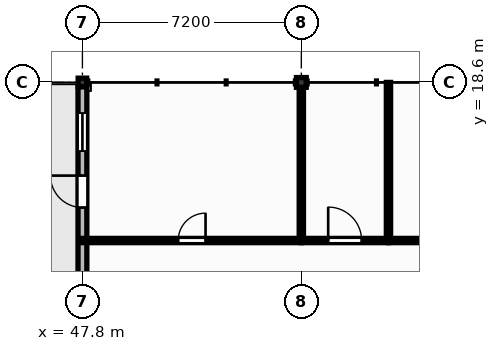
"""IFC4 building model, lengths in metres.
Left out: names, types, materials, properties, quantities, classifications, styles, units other than length and angle.
Written with IfcOpenShell. Run it as: python <this file> out.ifc"""

import sys

from ifc_helpers import new_model, si_unit, direction, frame, frame_2d, origin, origin_2d, place, context, subcontext, project, spatial, rectangle, extrude, element, fill, save


model = new_model("IFC4")
c1 = context("Model", 3, precision=1e-05, world=origin(), true_north=direction((0.0, 1.0)))
c2 = subcontext(c1, "Body", "Model", "MODEL_VIEW")
j1 = project(units=[si_unit("LENGTHUNIT", "METRE"), si_unit("PLANEANGLEUNIT", "RADIAN")], contexts=[c1])
p1 = place(None, origin())
s1 = spatial("IfcSite", under=j1, at=p1, CompositionType="ELEMENT")
p2 = place(p1, origin())
s2 = spatial("IfcBuilding", under=s1, at=p2, CompositionType="ELEMENT")
p3 = place(p2, frame((0.0, 0.0, 13.2)))
s3 = spatial("IfcBuildingStorey", under=s2, at=p3, CompositionType="ELEMENT", Elevation=13.2)
p4 = place(p3, frame((47.8, 18.6, 0.0), z_axis=(0.0, 0.0, 1.0), x_axis=(1.0, 0.0, 0.0)))
e1 = element("IfcColumn", 1, at=p4, inside=s3, PredefinedType="COLUMN", context=c2, shape_type="SweptSolid", body=[
    extrude(rectangle(XDim=0.28, YDim=0.28, at=origin_2d()), origin(), (0.0, 0.0, 1.0), 8.109),
])
p5 = place(p3, frame((55.0, 18.6, 0.0), z_axis=(0.0, 0.0, 1.0), x_axis=(1.0, 0.0, 0.0)))
e2 = element("IfcColumn", 2, at=p5, inside=s3, PredefinedType="COLUMN", context=c2, shape_type="SweptSolid", body=[
    extrude(rectangle(XDim=0.32, YDim=0.32, at=origin_2d()), origin(), (0.0, 0.0, 1.0), 8.109),
])
p6 = place(p3, frame((47.8, 11.56, 0.0), z_axis=(0.0, 0.0, 1.0), x_axis=(0.0, 1.0, 0.0)))
e3 = element("IfcWall", 3, at=p6, inside=s3, PredefinedType="SOLIDWALL", context=c2, shape_type="SweptSolid", body=[
    extrude(rectangle(XDim=6.9, YDim=0.29, at=frame_2d((3.45, 0.0))), origin(), (0.0, 0.0, 1.0), 4.0),
])
p7 = place(p6, frame((2.925, 0.0, 0.0)))
e4 = element("IfcOpeningElement", 4, at=p7, cuts=e3, PredefinedType="OPENING", context=c2, shape_type="SweptSolid", body=[
    extrude(rectangle(XDim=1.05, YDim=2.2, at=frame_2d((0.525, 1.1))), frame((0.0, 0.155, 0.0), z_axis=(0.0, -1.0, 0.0), x_axis=(1.0, 0.0, 0.0)), (0.0, 0.0, 1.0), 0.31),
])
p8 = place(p6, frame((4.782, 0.0, 1.35)))
e5 = element("IfcOpeningElement", 5, at=p8, cuts=e3, PredefinedType="OPENING", context=c2, shape_type="SweptSolid", body=[
    extrude(rectangle(XDim=1.25, YDim=1.4, at=frame_2d((0.625, 0.7))), frame((0.0, 0.155, 0.0), z_axis=(0.0, -1.0, 0.0), x_axis=(1.0, 0.0, 0.0)), (0.0, 0.0, 1.0), 0.31),
])
p9 = place(p3, frame((47.8, 13.4, 0.0), z_axis=(0.0, 0.0, 1.0), x_axis=(1.0, 0.0, 0.0)))
e6 = element("IfcWall", 6, at=p9, inside=s3, PredefinedType="PARTITIONING", context=c2, shape_type="SweptSolid", body=[
    extrude(rectangle(XDim=7.2, YDim=0.14, at=frame_2d((3.6, 0.0))), origin(), (0.0, 0.0, 1.0), 3.75),
])
p10 = place(p9, frame((3.15, 0.0, 0.0)))
e7 = element("IfcOpeningElement", 7, at=p10, cuts=e6, PredefinedType="OPENING", context=c2, shape_type="SweptSolid", body=[
    extrude(rectangle(XDim=0.9, YDim=2.1, at=frame_2d((0.45, 1.05))), frame((0.0, 0.08, 0.0), z_axis=(0.0, -1.0, 0.0), x_axis=(1.0, 0.0, 0.0)), (0.0, 0.0, 1.0), 0.16),
])
p11 = place(p3, frame((55.0, 13.47, 0.0), z_axis=(0.0, 0.0, 1.0), x_axis=(0.0, 1.0, 0.0)))
e8 = element("IfcWall", 8, at=p11, inside=s3, PredefinedType="PARTITIONING", context=c2, shape_type="SweptSolid", body=[
    extrude(rectangle(XDim=4.97, YDim=0.14, at=frame_2d((2.485, 0.0))), origin(), (0.0, 0.0, 1.0), 3.75),
])
p12 = place(p3, frame((55.0, 13.4, 0.0), z_axis=(0.0, 0.0, 1.0), x_axis=(1.0, 0.0, 0.0)))
e9 = element("IfcWall", 9, at=p12, inside=s3, PredefinedType="PARTITIONING", context=c2, shape_type="SweptSolid", body=[
    extrude(rectangle(XDim=2.866, YDim=0.14, at=frame_2d((1.433, 0.0))), origin(), (0.0, 0.0, 1.0), 3.75),
])
p13 = place(p12, frame((0.883, 0.0, 0.0)))
e10 = element("IfcOpeningElement", 10, at=p13, cuts=e9, PredefinedType="OPENING", context=c2, shape_type="SweptSolid", body=[
    extrude(rectangle(XDim=1.1, YDim=2.1, at=frame_2d((0.55, 1.05))), frame((0.0, 0.08, 0.0), z_axis=(0.0, -1.0, 0.0), x_axis=(1.0, 0.0, 0.0)), (0.0, 0.0, 1.0), 0.16),
])
p14 = place(p3, frame((57.866, 13.47, 0.0), z_axis=(0.0, 0.0, 1.0), x_axis=(0.0, 1.0, 0.0)))
e11 = element("IfcWall", 11, at=p14, inside=s3, PredefinedType="PARTITIONING", context=c2, shape_type="SweptSolid", body=[
    extrude(rectangle(XDim=5.13, YDim=0.14, at=frame_2d((2.565, 0.0))), origin(), (0.0, 0.0, 1.0), 3.75),
])
p15 = place(p3, frame((57.866, 13.4, 0.0), z_axis=(0.0, 0.0, 1.0), x_axis=(1.0, 0.0, 0.0)))
e12 = element("IfcWall", 12, at=p15, inside=s3, PredefinedType="PARTITIONING", context=c2, shape_type="SweptSolid", body=[
    extrude(rectangle(XDim=4.334, YDim=0.14, at=frame_2d((2.167, 0.0))), origin(), (0.0, 0.0, 1.0), 3.75),
])
p16 = place(p15, frame((1.677, 0.0, 0.0)))
e13 = element("IfcOpeningElement", 13, at=p16, cuts=e12, PredefinedType="OPENING", context=c2, shape_type="SweptSolid", body=[
    extrude(rectangle(XDim=0.98, YDim=2.15, at=frame_2d((0.49, 1.075))), frame((0.0, 0.08, 0.0), z_axis=(0.0, -1.0, 0.0), x_axis=(1.0, 0.0, 0.0)), (0.0, 0.0, 1.0), 0.16),
])
p17 = place(p7, origin())
e14 = element("IfcDoor", 14, at=p17, inside=s3, OperationType="SINGLE_SWING_RIGHT", PredefinedType="DOOR", context=c2, shape_type="SweptSolid", body=[
    extrude(rectangle(XDim=1.05, YDim=2.2, at=frame_2d((0.525, 1.1))), frame((0.0, 0.025, 0.0), z_axis=(0.0, -1.0, 0.0), x_axis=(1.0, 0.0, 0.0)), (0.0, 0.0, 1.0), 0.05),
])
fill(e4, e14)
p18 = place(p8, origin())
e15 = element("IfcWindow", 15, at=p18, inside=s3, PartitioningType="SINGLE_PANEL", PredefinedType="WINDOW", context=c2, shape_type="SweptSolid", body=[
    extrude(rectangle(XDim=1.25, YDim=1.4, at=frame_2d((0.625, 0.7))), frame((0.0, 0.03, 0.0), z_axis=(0.0, -1.0, 0.0), x_axis=(1.0, 0.0, 0.0)), (0.0, 0.0, 1.0), 0.06),
])
fill(e5, e15)
p19 = place(p10, origin())
e16 = element("IfcDoor", 16, at=p19, inside=s3, OperationType="SINGLE_SWING_RIGHT", PredefinedType="DOOR", context=c2, shape_type="SweptSolid", body=[
    extrude(rectangle(XDim=0.9, YDim=2.1, at=frame_2d((0.45, 1.05))), frame((0.0, 0.025, 0.0), z_axis=(0.0, -1.0, 0.0), x_axis=(1.0, 0.0, 0.0)), (0.0, 0.0, 1.0), 0.05),
])
fill(e7, e16)
p20 = place(p13, origin())
e17 = element("IfcDoor", 17, at=p20, inside=s3, OperationType="SINGLE_SWING_LEFT", PredefinedType="DOOR", context=c2, shape_type="SweptSolid", body=[
    extrude(rectangle(XDim=1.1, YDim=2.1, at=frame_2d((0.55, 1.05))), frame((0.0, 0.025, 0.0), z_axis=(0.0, -1.0, 0.0), x_axis=(1.0, 0.0, 0.0)), (0.0, 0.0, 1.0), 0.05),
])
fill(e10, e17)
save(model, sys.argv[1])
